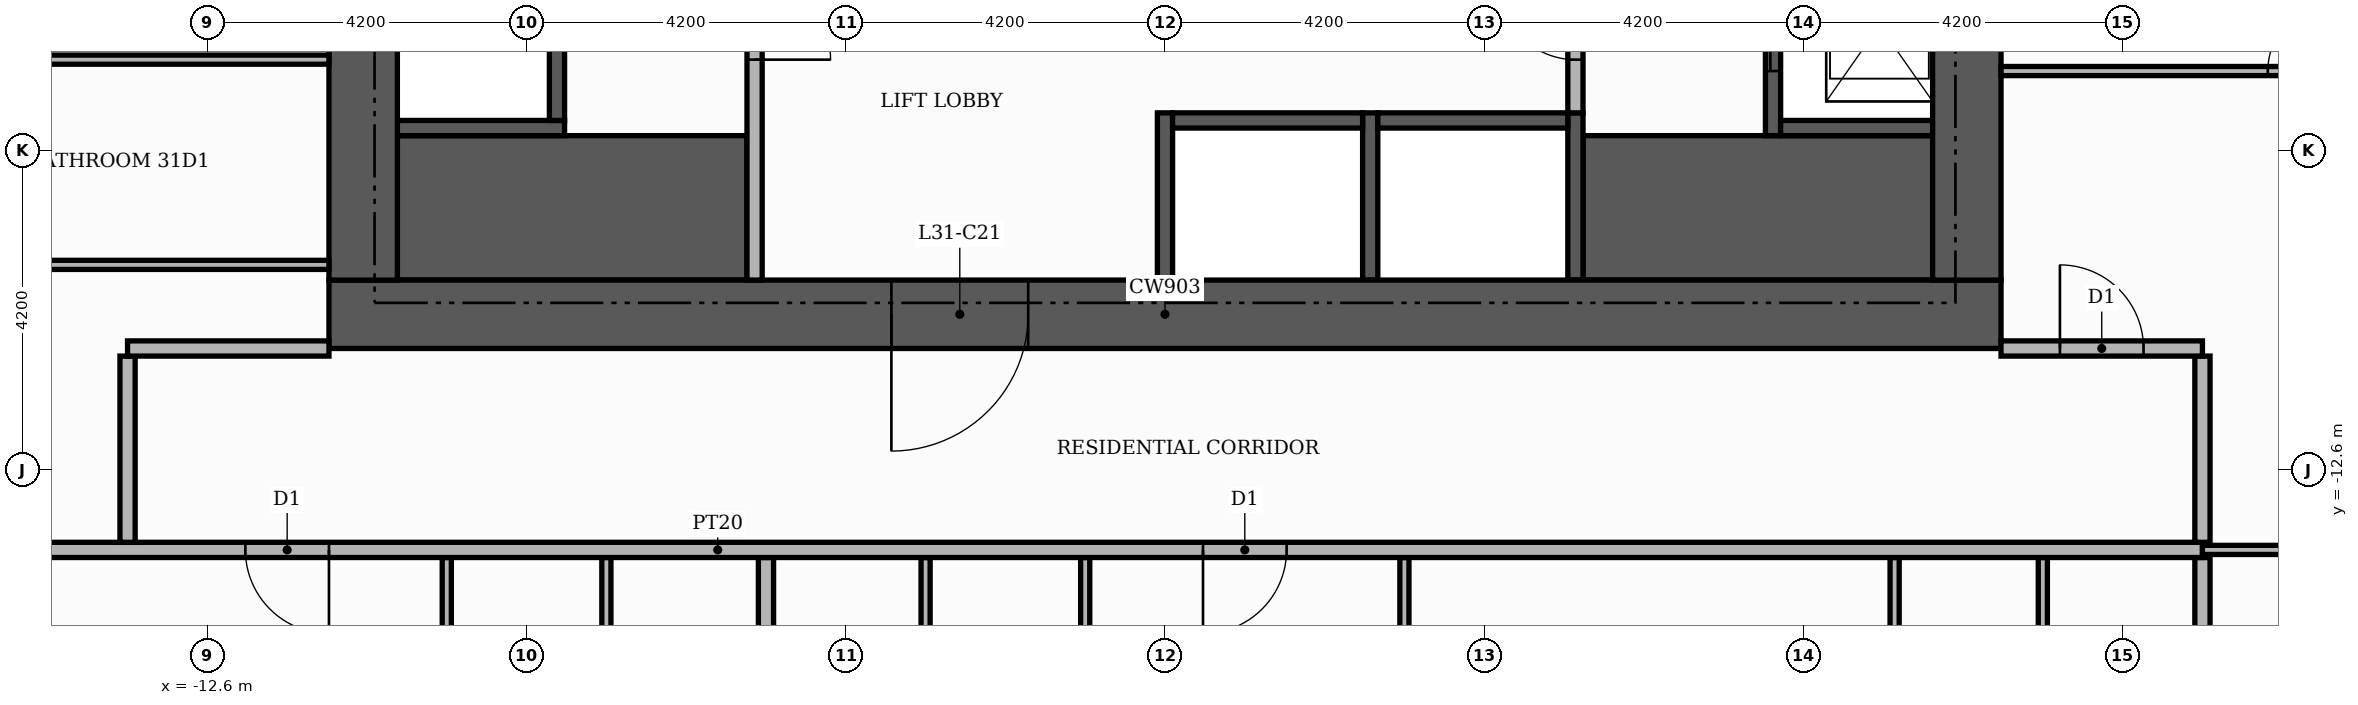
"""IFC4 building model, lengths in metres.
Left out: names, types, materials, properties, quantities, classifications, styles, units other than length and angle.
Written with IfcOpenShell. Run it as: python <this file> out.ifc"""

import sys

from ifc_helpers import new_model, si_unit, direction, frame, frame_2d, origin, place, context, subcontext, project, spatial, rectangle, extrude, element, fill, save


model = new_model("IFC4")
c1 = context("Model", 3, precision=1e-05, world=origin(), true_north=direction((0.0, 1.0)))
c2 = subcontext(c1, "Body", "Model", "MODEL_VIEW")
j1 = project(units=[si_unit("LENGTHUNIT", "METRE"), si_unit("PLANEANGLEUNIT", "RADIAN")], contexts=[c1])
p1 = place(None, origin())
s1 = spatial("IfcSite", under=j1, at=p1, CompositionType="ELEMENT")
p2 = place(p1, origin())
s2 = spatial("IfcBuilding", under=s1, at=p2, CompositionType="ELEMENT")
p3 = place(p2, frame((0.0, 0.0, 133.8)))
s3 = spatial("IfcBuildingStorey", under=s2, at=p3, CompositionType="ELEMENT", Elevation=133.8)
for number, where, z_axis, x_axis in (
    (1, (-10.1, -9.15, 0.0), (0.0, 0.0, 1.0), (1.0, 0.0, 0.0)),
    (2, (5.5, -9.15, 0.0), (0.0, 0.0, 1.0), (1.0, 0.0, 0.0)),
):
    element("IfcWall", number, at=place(p3, frame(where, z_axis=z_axis, x_axis=x_axis)), inside=s3, PredefinedType="SHEAR", context=c2, shape_type="SweptSolid", body=[
        extrude(rectangle(XDim=4.6, YDim=1.9, at=frame_2d((2.3, 0.0))), origin(), (0.0, 0.0, 1.0), 3.48),
    ])
for number, where, z_axis, x_axis in (
    (3, (0.0, -10.1, 0.0), (0.0, 0.0, 1.0), (0.0, 1.0, 0.0)),
    (4, (2.7, -10.1, 0.0), (0.0, 0.0, 1.0), (0.0, 1.0, 0.0)),
    (5, (5.4, -10.1, 0.0), (0.0, 0.0, 1.0), (0.0, 1.0, 0.0)),
    (6, (-10.1, -8.1, 0.0), (0.0, 0.0, 1.0), (1.0, 0.0, 0.0)),
):
    element("IfcWall", number, at=place(p3, frame(where, z_axis=z_axis, x_axis=x_axis)), inside=s3, PredefinedType="SHEAR", context=c2, shape_type="SweptSolid", body=[
        extrude(rectangle(XDim=2.2, YDim=0.2, at=frame_2d((1.1, 0.0))), origin(), (0.0, 0.0, 1.0), 3.48),
    ])
p4 = place(p3, frame((8.0, -8.2, 0.0), z_axis=(0.0, 0.0, 1.0), x_axis=(0.0, 1.0, 0.0)))
e7 = element("IfcWall", 7, at=p4, inside=s3, PredefinedType="SHEAR", context=c2, shape_type="SweptSolid", body=[
    extrude(rectangle(XDim=16.4, YDim=0.2, at=frame_2d((8.2, 0.0))), origin(), (0.0, 0.0, 1.0), 3.48),
])
p5 = place(p4, frame((0.85, 0.0, 0.0)))
e8 = element("IfcOpeningElement", 8, at=p5, cuts=e7, PredefinedType="OPENING", context=c2, shape_type="SweptSolid", body=[
    extrude(rectangle(XDim=1.2, YDim=2.1, at=frame_2d((0.6, 1.05))), frame((0.0, 0.11, 0.0), z_axis=(0.0, -1.0, 0.0), x_axis=(1.0, 0.0, 0.0)), (0.0, 0.0, 1.0), 0.22),
])
p6 = place(p4, frame((3.55, 0.0, 0.0)))
e9 = element("IfcOpeningElement", 9, at=p6, cuts=e7, PredefinedType="OPENING", context=c2, shape_type="SweptSolid", body=[
    extrude(rectangle(XDim=1.2, YDim=2.1, at=frame_2d((0.6, 1.05))), frame((0.0, 0.11, 0.0), z_axis=(0.0, -1.0, 0.0), x_axis=(1.0, 0.0, 0.0)), (0.0, 0.0, 1.0), 0.22),
])
p7 = place(p4, frame((6.25, 0.0, 0.0)))
e10 = element("IfcOpeningElement", 10, at=p7, cuts=e7, PredefinedType="OPENING", context=c2, shape_type="SweptSolid", body=[
    extrude(rectangle(XDim=1.2, YDim=2.1, at=frame_2d((0.6, 1.05))), frame((0.0, 0.11, 0.0), z_axis=(0.0, -1.0, 0.0), x_axis=(1.0, 0.0, 0.0)), (0.0, 0.0, 1.0), 0.22),
])
p8 = place(p4, frame((8.95, 0.0, 0.0)))
e11 = element("IfcOpeningElement", 11, at=p8, cuts=e7, PredefinedType="OPENING", context=c2, shape_type="SweptSolid", body=[
    extrude(rectangle(XDim=1.2, YDim=2.1, at=frame_2d((0.6, 1.05))), frame((0.0, 0.11, 0.0), z_axis=(0.0, -1.0, 0.0), x_axis=(1.0, 0.0, 0.0)), (0.0, 0.0, 1.0), 0.22),
])
p9 = place(p4, frame((11.65, 0.0, 0.0)))
e12 = element("IfcOpeningElement", 12, at=p9, cuts=e7, PredefinedType="OPENING", context=c2, shape_type="SweptSolid", body=[
    extrude(rectangle(XDim=1.2, YDim=2.1, at=frame_2d((0.6, 1.05))), frame((0.0, 0.11, 0.0), z_axis=(0.0, -1.0, 0.0), x_axis=(1.0, 0.0, 0.0)), (0.0, 0.0, 1.0), 0.22),
])
p10 = place(p4, frame((14.35, 0.0, 0.0)))
e13 = element("IfcOpeningElement", 13, at=p10, cuts=e7, PredefinedType="OPENING", context=c2, shape_type="SweptSolid", body=[
    extrude(rectangle(XDim=1.2, YDim=2.1, at=frame_2d((0.6, 1.05))), frame((0.0, 0.11, 0.0), z_axis=(0.0, -1.0, 0.0), x_axis=(1.0, 0.0, 0.0)), (0.0, 0.0, 1.0), 0.22),
])
p11 = place(p3, frame((8.1, -8.1, 0.0), z_axis=(0.0, 0.0, 1.0), x_axis=(1.0, 0.0, 0.0)))
e14 = element("IfcWall", 14, at=p11, inside=s3, PredefinedType="SHEAR", context=c2, shape_type="SweptSolid", body=[
    extrude(rectangle(XDim=2.0, YDim=0.2, at=frame_2d((1.0, 0.0))), origin(), (0.0, 0.0, 1.0), 3.48),
])
for number, where, z_axis, x_axis in (
    (15, (0.1, -8.0, 0.0), (0.0, 0.0, 1.0), (1.0, 0.0, 0.0)),
    (16, (2.8, -8.0, 0.0), (0.0, 0.0, 1.0), (1.0, 0.0, 0.0)),
):
    element("IfcWall", number, at=place(p3, frame(where, z_axis=z_axis, x_axis=x_axis)), inside=s3, PredefinedType="SHEAR", context=c2, shape_type="SweptSolid", body=[
        extrude(rectangle(XDim=2.5, YDim=0.2, at=frame_2d((1.25, 0.0))), origin(), (0.0, 0.0, 1.0), 3.48),
    ])
p12 = place(p3, frame((-8.0, -8.0, 0.0), z_axis=(0.0, 0.0, 1.0), x_axis=(0.0, 1.0, 0.0)))
e17 = element("IfcWall", 17, at=p12, inside=s3, PredefinedType="SHEAR", context=c2, shape_type="SweptSolid", body=[
    extrude(rectangle(XDim=16.2, YDim=0.2, at=frame_2d((8.1, 0.0))), origin(), (0.0, 0.0, 1.0), 3.48),
])
p13 = place(p3, frame((-11.0, -10.55, 0.0), z_axis=(0.0, 0.0, 1.0), x_axis=(1.0, 0.0, 0.0)))
e18 = element("IfcWall", 18, at=p13, inside=s3, PredefinedType="SHEAR", context=c2, shape_type="SweptSolid", body=[
    extrude(rectangle(XDim=22.0, YDim=0.9, at=frame_2d((11.0, 0.0))), origin(), (0.0, 0.0, 1.0), 3.48),
])
p14 = place(p13, frame((7.4, 0.0, 0.0)))
e19 = element("IfcOpeningElement", 19, at=p14, cuts=e18, PredefinedType="OPENING", context=c2, shape_type="SweptSolid", body=[
    extrude(rectangle(XDim=1.8, YDim=2.2, at=frame_2d((0.9, 1.1))), frame((0.0, 0.46, 0.0), z_axis=(0.0, -1.0, 0.0), x_axis=(1.0, 0.0, 0.0)), (0.0, 0.0, 1.0), 0.92),
])
for number, where, z_axis, x_axis in (
    (20, (-10.55, -10.1, 0.0), (0.0, 0.0, 1.0), (0.0, 1.0, 0.0)),
    (21, (10.55, -10.1, 0.0), (0.0, 0.0, 1.0), (0.0, 1.0, 0.0)),
):
    element("IfcWall", number, at=place(p3, frame(where, z_axis=z_axis, x_axis=x_axis)), inside=s3, PredefinedType="SHEAR", context=c2, shape_type="SweptSolid", body=[
        extrude(rectangle(XDim=20.2, YDim=0.9, at=frame_2d((10.1, 0.0))), origin(), (0.0, 0.0, 1.0), 3.48),
    ])
p15 = place(p3, frame((-5.4, -10.1, 0.0), z_axis=(0.0, 0.0, 1.0), x_axis=(0.0, 1.0, 0.0)))
e22 = element("IfcWall", 22, at=p15, inside=s3, PredefinedType="PARTITIONING", context=c2, shape_type="SweptSolid", body=[
    extrude(rectangle(XDim=4.6, YDim=0.2, at=frame_2d((2.3, 0.0))), origin(), (0.0, 0.0, 1.0), 3.48),
])
p16 = place(p15, frame((2.9, 0.0, 0.0)))
e23 = element("IfcOpeningElement", 23, at=p16, cuts=e22, PredefinedType="OPENING", context=c2, shape_type="SweptSolid", body=[
    extrude(rectangle(XDim=1.0, YDim=2.1, at=frame_2d((0.5, 1.05))), frame((0.0, 0.11, 0.0), z_axis=(0.0, -1.0, 0.0), x_axis=(1.0, 0.0, 0.0)), (0.0, 0.0, 1.0), 0.22),
])
p17 = place(p3, frame((5.4, -7.9, 0.0), z_axis=(0.0, 0.0, 1.0), x_axis=(0.0, 1.0, 0.0)))
e24 = element("IfcWall", 24, at=p17, inside=s3, PredefinedType="PARTITIONING", context=c2, shape_type="SweptSolid", body=[
    extrude(rectangle(XDim=2.4, YDim=0.2, at=frame_2d((1.2, 0.0))), origin(), (0.0, 0.0, 1.0), 3.48),
])
p18 = place(p17, frame((0.7, 0.0, 0.0)))
e25 = element("IfcOpeningElement", 25, at=p18, cuts=e24, PredefinedType="OPENING", context=c2, shape_type="SweptSolid", body=[
    extrude(rectangle(XDim=1.0, YDim=2.1, at=frame_2d((0.5, 1.05))), frame((0.0, 0.11, 0.0), z_axis=(0.0, -1.0, 0.0), x_axis=(1.0, 0.0, 0.0)), (0.0, 0.0, 1.0), 0.22),
])
for number, where, z_axis, x_axis in (
    (26, (-5.25, -25.42, 0.0), (0.0, 0.0, 1.0), (0.0, 1.0, 0.0)),
    (27, (13.65, -25.42, 0.0), (0.0, 0.0, 1.0), (0.0, 1.0, 0.0)),
):
    element("IfcWall", number, at=place(p3, frame(where, z_axis=z_axis, x_axis=x_axis)), inside=s3, PredefinedType="PARTITIONING", context=c2, shape_type="SweptSolid", body=[
        extrude(rectangle(XDim=11.67, YDim=0.2, at=frame_2d((5.835, 0.0))), origin(), (0.0, 0.0, 1.0), 3.48),
    ])
p19 = place(p3, frame((-9.45, -19.16, 0.0), z_axis=(0.0, 0.0, 1.0), x_axis=(0.0, 1.0, 0.0)))
e28 = element("IfcWall", 28, at=p19, inside=s3, PredefinedType="PARTITIONING", context=c2, shape_type="SweptSolid", body=[
    extrude(rectangle(XDim=5.41, YDim=0.12, at=frame_2d((2.705, 0.0))), origin(), (0.0, 0.0, 1.0), 3.48),
])
p20 = place(p19, frame((2.275, 0.0, 0.0)))
e29 = element("IfcOpeningElement", 29, at=p20, cuts=e28, PredefinedType="OPENING", context=c2, shape_type="SweptSolid", body=[
    extrude(rectangle(XDim=0.9, YDim=2.1, at=frame_2d((0.45, 1.05))), frame((0.0, 0.07, 0.0), z_axis=(0.0, -1.0, 0.0), x_axis=(1.0, 0.0, 0.0)), (0.0, 0.0, 1.0), 0.14),
])
p21 = place(p3, frame((-7.35, -19.16, 0.0), z_axis=(0.0, 0.0, 1.0), x_axis=(0.0, 1.0, 0.0)))
e30 = element("IfcWall", 30, at=p21, inside=s3, PredefinedType="PARTITIONING", context=c2, shape_type="SweptSolid", body=[
    extrude(rectangle(XDim=5.41, YDim=0.12, at=frame_2d((2.705, 0.0))), origin(), (0.0, 0.0, 1.0), 3.48),
])
p22 = place(p3, frame((-3.15, -18.26, 0.0), z_axis=(0.0, 0.0, 1.0), x_axis=(0.0, 1.0, 0.0)))
e31 = element("IfcWall", 31, at=p22, inside=s3, PredefinedType="PARTITIONING", context=c2, shape_type="SweptSolid", body=[
    extrude(rectangle(XDim=4.51, YDim=0.12, at=frame_2d((2.255, 0.0))), origin(), (0.0, 0.0, 1.0), 3.48),
])
p23 = place(p3, frame((-1.05, -18.26, 0.0), z_axis=(0.0, 0.0, 1.0), x_axis=(0.0, 1.0, 0.0)))
e32 = element("IfcWall", 32, at=p23, inside=s3, PredefinedType="PARTITIONING", context=c2, shape_type="SweptSolid", body=[
    extrude(rectangle(XDim=4.51, YDim=0.12, at=frame_2d((2.255, 0.0))), origin(), (0.0, 0.0, 1.0), 3.48),
])
p24 = place(p23, frame((1.825, 0.0, 0.0)))
e33 = element("IfcOpeningElement", 33, at=p24, cuts=e32, PredefinedType="OPENING", context=c2, shape_type="SweptSolid", body=[
    extrude(rectangle(XDim=0.9, YDim=2.1, at=frame_2d((0.45, 1.05))), frame((0.0, 0.07, 0.0), z_axis=(0.0, -1.0, 0.0), x_axis=(1.0, 0.0, 0.0)), (0.0, 0.0, 1.0), 0.14),
])
for number, where, z_axis, x_axis in (
    (34, (3.15, -18.26, 0.0), (0.0, 0.0, 1.0), (0.0, 1.0, 0.0)),
    (35, (9.6, -18.26, 0.0), (0.0, 0.0, 1.0), (0.0, 1.0, 0.0)),
    (36, (11.55, -18.26, 0.0), (0.0, 0.0, 1.0), (0.0, 1.0, 0.0)),
):
    element("IfcWall", number, at=place(p3, frame(where, z_axis=z_axis, x_axis=x_axis)), inside=s3, PredefinedType="PARTITIONING", context=c2, shape_type="SweptSolid", body=[
        extrude(rectangle(XDim=4.51, YDim=0.12, at=frame_2d((2.255, 0.0))), origin(), (0.0, 0.0, 1.0), 3.48),
    ])
p25 = place(p3, frame((-25.42, -13.65, 0.0), z_axis=(0.0, 0.0, 1.0), x_axis=(1.0, 0.0, 0.0)))
e37 = element("IfcWall", 37, at=p25, inside=s3, PredefinedType="PARTITIONING", context=c2, shape_type="SweptSolid", body=[
    extrude(rectangle(XDim=39.07, YDim=0.2, at=frame_2d((19.535, 0.0))), origin(), (0.0, 0.0, 1.0), 3.48),
])
p26 = place(p25, frame((13.32, 0.0, 0.0)))
e38 = element("IfcOpeningElement", 38, at=p26, cuts=e37, PredefinedType="OPENING", context=c2, shape_type="SweptSolid", body=[
    extrude(rectangle(XDim=1.1, YDim=2.4, at=frame_2d((0.55, 1.2))), frame((0.0, 0.11, 0.0), z_axis=(0.0, -1.0, 0.0), x_axis=(1.0, 0.0, 0.0)), (0.0, 0.0, 1.0), 0.22),
])
p27 = place(p25, frame((25.92, 0.0, 0.0)))
e39 = element("IfcOpeningElement", 39, at=p27, cuts=e37, PredefinedType="OPENING", context=c2, shape_type="SweptSolid", body=[
    extrude(rectangle(XDim=1.1, YDim=2.4, at=frame_2d((0.55, 1.2))), frame((0.0, 0.11, 0.0), z_axis=(0.0, -1.0, 0.0), x_axis=(1.0, 0.0, 0.0)), (0.0, 0.0, 1.0), 0.22),
])
p28 = place(p3, frame((13.65, -13.65, 0.0), z_axis=(0.0, 0.0, 1.0), x_axis=(1.0, 0.0, 0.0)))
e40 = element("IfcWall", 40, at=p28, inside=s3, PredefinedType="PARTITIONING", context=c2, shape_type="SweptSolid", body=[
    extrude(rectangle(XDim=6.77, YDim=0.12, at=frame_2d((3.385, 0.0))), origin(), (0.0, 0.0, 1.0), 3.48),
])
p29 = place(p28, frame((2.935, 0.0, 0.0)))
e41 = element("IfcOpeningElement", 41, at=p29, cuts=e40, PredefinedType="OPENING", context=c2, shape_type="SweptSolid", body=[
    extrude(rectangle(XDim=0.9, YDim=2.1, at=frame_2d((0.45, 1.05))), frame((0.0, 0.07, 0.0), z_axis=(0.0, -1.0, 0.0), x_axis=(1.0, 0.0, 0.0)), (0.0, 0.0, 1.0), 0.14),
])
for number, where, z_axis, x_axis in (
    (42, (-13.65, -13.55, 0.0), (0.0, 0.0, 1.0), (0.0, 1.0, 0.0)),
    (43, (13.65, -13.55, 0.0), (0.0, 0.0, 1.0), (0.0, 1.0, 0.0)),
):
    element("IfcWall", number, at=place(p3, frame(where, z_axis=z_axis, x_axis=x_axis)), inside=s3, PredefinedType="PARTITIONING", context=c2, shape_type="SweptSolid", body=[
        extrude(rectangle(XDim=2.45, YDim=0.2, at=frame_2d((1.225, 0.0))), origin(), (0.0, 0.0, 1.0), 3.48),
    ])
p30 = place(p3, frame((-13.65, -11.0, 0.0), z_axis=(0.0, 0.0, 1.0), x_axis=(1.0, 0.0, 0.0)))
e44 = element("IfcWall", 44, at=p30, inside=s3, PredefinedType="PARTITIONING", context=c2, shape_type="SweptSolid", body=[
    extrude(rectangle(XDim=2.65, YDim=0.2, at=frame_2d((1.325, 0.0))), origin(), (0.0, 0.0, 1.0), 3.48),
])
p31 = place(p3, frame((11.0, -11.0, 0.0), z_axis=(0.0, 0.0, 1.0), x_axis=(1.0, 0.0, 0.0)))
e45 = element("IfcWall", 45, at=p31, inside=s3, PredefinedType="PARTITIONING", context=c2, shape_type="SweptSolid", body=[
    extrude(rectangle(XDim=2.65, YDim=0.2, at=frame_2d((1.325, 0.0))), origin(), (0.0, 0.0, 1.0), 3.48),
])
p32 = place(p31, frame((0.775, 0.0, 0.0)))
e46 = element("IfcOpeningElement", 46, at=p32, cuts=e45, PredefinedType="OPENING", context=c2, shape_type="SweptSolid", body=[
    extrude(rectangle(XDim=1.1, YDim=2.4, at=frame_2d((0.55, 1.2))), frame((0.0, 0.11, 0.0), z_axis=(0.0, -1.0, 0.0), x_axis=(1.0, 0.0, 0.0)), (0.0, 0.0, 1.0), 0.22),
])
p33 = place(p3, frame((-18.32, -9.9, 0.0), z_axis=(0.0, 0.0, 1.0), x_axis=(1.0, 0.0, 0.0)))
e47 = element("IfcWall", 47, at=p33, inside=s3, PredefinedType="PARTITIONING", context=c2, shape_type="SweptSolid", body=[
    extrude(rectangle(XDim=7.32, YDim=0.12, at=frame_2d((3.66, 0.0))), origin(), (0.0, 0.0, 1.0), 3.48),
])
p34 = place(p3, frame((11.0, -7.35, 0.0), z_axis=(0.0, 0.0, 1.0), x_axis=(1.0, 0.0, 0.0)))
e48 = element("IfcWall", 48, at=p34, inside=s3, PredefinedType="PARTITIONING", context=c2, shape_type="SweptSolid", body=[
    extrude(rectangle(XDim=7.92, YDim=0.12, at=frame_2d((3.96, 0.0))), origin(), (0.0, 0.0, 1.0), 3.48),
])
p35 = place(p34, frame((3.51, 0.0, 0.0)))
e49 = element("IfcOpeningElement", 49, at=p35, cuts=e48, PredefinedType="OPENING", context=c2, shape_type="SweptSolid", body=[
    extrude(rectangle(XDim=0.9, YDim=2.1, at=frame_2d((0.45, 1.05))), frame((0.0, 0.07, 0.0), z_axis=(0.0, -1.0, 0.0), x_axis=(1.0, 0.0, 0.0)), (0.0, 0.0, 1.0), 0.14),
])
p36 = place(p3, frame((-18.32, -7.2, 0.0), z_axis=(0.0, 0.0, 1.0), x_axis=(1.0, 0.0, 0.0)))
e50 = element("IfcWall", 50, at=p36, inside=s3, PredefinedType="PARTITIONING", context=c2, shape_type="SweptSolid", body=[
    extrude(rectangle(XDim=7.32, YDim=0.12, at=frame_2d((3.66, 0.0))), origin(), (0.0, 0.0, 1.0), 3.48),
])
p37 = place(p5, origin())
e51 = element("IfcDoor", 51, at=p37, inside=s3, OperationType="SLIDING_TO_LEFT", PredefinedType="DOOR", context=c2, shape_type="SweptSolid", body=[
    extrude(rectangle(XDim=1.2, YDim=2.1, at=frame_2d((0.6, 1.05))), frame((0.0, 0.025, 0.0), z_axis=(0.0, -1.0, 0.0), x_axis=(1.0, 0.0, 0.0)), (0.0, 0.0, 1.0), 0.05),
])
fill(e8, e51)
p38 = place(p16, frame((1.0, 0.0, 0.0), z_axis=(0.0, 0.0, 1.0), x_axis=(-1.0, 0.0, 0.0)))
e52 = element("IfcDoor", 52, at=p38, inside=s3, OperationType="SINGLE_SWING_LEFT", PredefinedType="DOOR", context=c2, shape_type="SweptSolid", body=[
    extrude(rectangle(XDim=1.0, YDim=2.1, at=frame_2d((0.5, 1.05))), frame((0.0, 0.025, 0.0), z_axis=(0.0, -1.0, 0.0), x_axis=(1.0, 0.0, 0.0)), (0.0, 0.0, 1.0), 0.05),
])
fill(e23, e52)
p39 = place(p18, origin())
e53 = element("IfcDoor", 53, at=p39, inside=s3, OperationType="SINGLE_SWING_RIGHT", PredefinedType="DOOR", context=c2, shape_type="SweptSolid", body=[
    extrude(rectangle(XDim=1.0, YDim=2.1, at=frame_2d((0.5, 1.05))), frame((0.0, 0.025, 0.0), z_axis=(0.0, -1.0, 0.0), x_axis=(1.0, 0.0, 0.0)), (0.0, 0.0, 1.0), 0.05),
])
fill(e25, e53)
p40 = place(p14, frame((1.8, 0.0, 0.0), z_axis=(0.0, 0.0, 1.0), x_axis=(-1.0, 0.0, 0.0)))
e54 = element("IfcDoor", 54, at=p40, inside=s3, OperationType="DOUBLE_DOOR_SINGLE_SWING", PredefinedType="DOOR", context=c2, shape_type="SweptSolid", body=[
    extrude(rectangle(XDim=1.8, YDim=2.2, at=frame_2d((0.9, 1.1))), frame((0.0, 0.025, 0.0), z_axis=(0.0, -1.0, 0.0), x_axis=(1.0, 0.0, 0.0)), (0.0, 0.0, 1.0), 0.05),
])
fill(e19, e54)
p41 = place(p26, frame((1.1, 0.0, 0.0), z_axis=(0.0, 0.0, 1.0), x_axis=(-1.0, 0.0, 0.0)))
e55 = element("IfcDoor", 55, at=p41, inside=s3, OperationType="SINGLE_SWING_RIGHT", PredefinedType="DOOR", context=c2, shape_type="SweptSolid", body=[
    extrude(rectangle(XDim=1.1, YDim=2.4, at=frame_2d((0.55, 1.2))), frame((0.0, 0.025, 0.0), z_axis=(0.0, -1.0, 0.0), x_axis=(1.0, 0.0, 0.0)), (0.0, 0.0, 1.0), 0.05),
])
fill(e38, e55)
p42 = place(p27, frame((1.1, 0.0, 0.0), z_axis=(0.0, 0.0, 1.0), x_axis=(-1.0, 0.0, 0.0)))
e56 = element("IfcDoor", 56, at=p42, inside=s3, OperationType="SINGLE_SWING_LEFT", PredefinedType="DOOR", context=c2, shape_type="SweptSolid", body=[
    extrude(rectangle(XDim=1.1, YDim=2.4, at=frame_2d((0.55, 1.2))), frame((0.0, 0.025, 0.0), z_axis=(0.0, -1.0, 0.0), x_axis=(1.0, 0.0, 0.0)), (0.0, 0.0, 1.0), 0.05),
])
fill(e39, e56)
p43 = place(p32, origin())
e57 = element("IfcDoor", 57, at=p43, inside=s3, OperationType="SINGLE_SWING_LEFT", PredefinedType="DOOR", context=c2, shape_type="SweptSolid", body=[
    extrude(rectangle(XDim=1.1, YDim=2.4, at=frame_2d((0.55, 1.2))), frame((0.0, 0.025, 0.0), z_axis=(0.0, -1.0, 0.0), x_axis=(1.0, 0.0, 0.0)), (0.0, 0.0, 1.0), 0.05),
])
fill(e46, e57)
p44 = place(p35, origin())
e58 = element("IfcDoor", 58, at=p44, inside=s3, OperationType="SINGLE_SWING_RIGHT", PredefinedType="DOOR", context=c2, shape_type="SweptSolid", body=[
    extrude(rectangle(XDim=0.9, YDim=2.1, at=frame_2d((0.45, 1.05))), frame((0.0, 0.025, 0.0), z_axis=(0.0, -1.0, 0.0), x_axis=(1.0, 0.0, 0.0)), (0.0, 0.0, 1.0), 0.05),
])
fill(e49, e58)
save(model, sys.argv[1])
